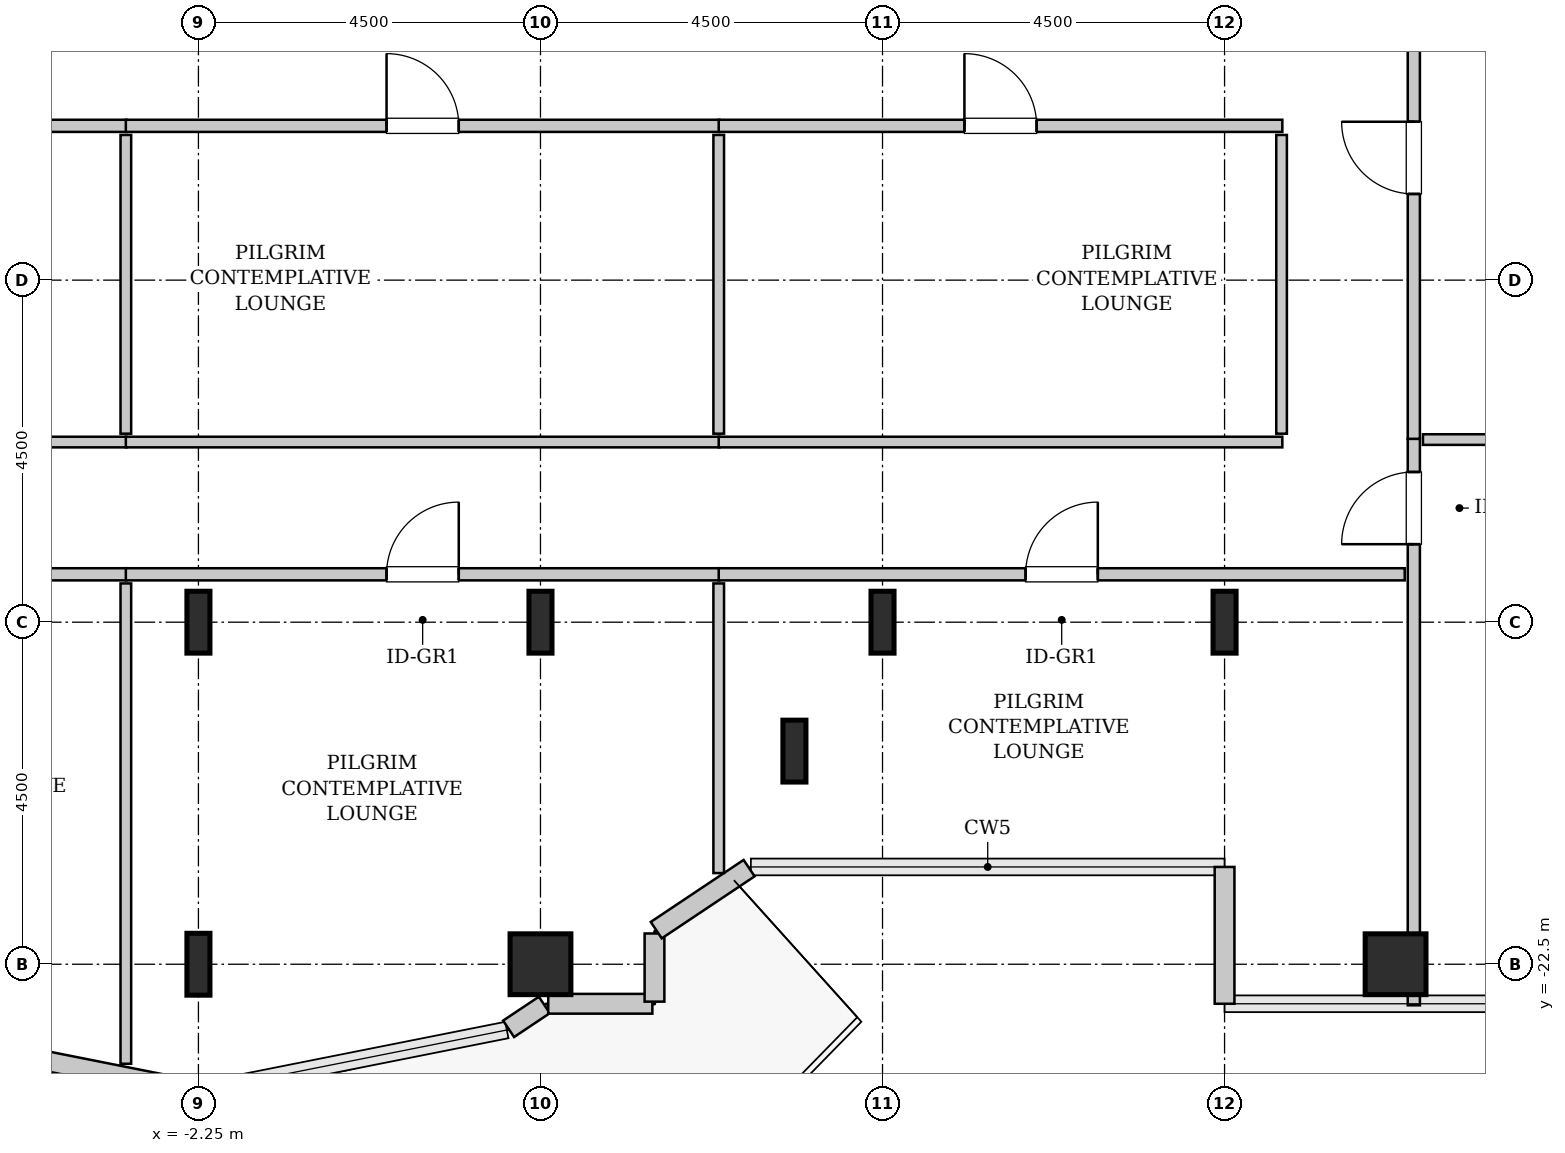
"""IFC4 building model, lengths in metres.
Left out: names, types, materials, properties, quantities, classifications, styles, units other than length and angle.
Written with IfcOpenShell. Run it as: python <this file> out.ifc"""

import sys

from ifc_helpers import new_model, si_unit, direction, frame, frame_2d, origin, origin_2d, place, context, subcontext, project, spatial, rectangle, hollow_rectangle, i_section, extrude, source, transform, mapped, element, fill, save


model = new_model("IFC4")
c1 = context("Model", 3, precision=1e-05, world=origin(), true_north=direction((0.0, 1.0)))
c2 = subcontext(c1, "Body", "Model", "MODEL_VIEW")
j1 = project(units=[si_unit("LENGTHUNIT", "METRE"), si_unit("PLANEANGLEUNIT", "RADIAN")], contexts=[c1])
p1 = place(None, origin())
s1 = spatial("IfcSite", under=j1, at=p1, CompositionType="ELEMENT")
p2 = place(p1, origin())
s2 = spatial("IfcBuilding", under=s1, at=p2, CompositionType="ELEMENT")
p3 = place(p2, frame((0.0, 0.0, 194.4)))
s3 = spatial("IfcBuildingStorey", under=s2, at=p3, CompositionType="ELEMENT", Elevation=194.4)
m1 = source(origin(), c2, "Body", "SweptSolid", [
    extrude(i_section(OverallWidth=0.303, OverallDepth=0.814, WebThickness=0.021, FlangeThickness=0.04, FilletRadius=0.03, at=origin_2d()), origin(), (0.0, 0.0, 1.0), 3.8),
])
for number, where, z_axis, x_axis in (
    (1, (-2.25, -22.5, 0.0), (0.0, 0.0, 1.0), (1.0, 0.0, 0.0)),
    (2, (-2.25, -18.0, 0.0), (0.0, 0.0, 1.0), (1.0, 0.0, 0.0)),
):
    element("IfcColumn", number, at=place(p3, frame(where, z_axis=z_axis, x_axis=x_axis)), inside=s3, PredefinedType="COLUMN", context=c2, shape_type="MappedRepresentation", body=[
        mapped(m1, transform((0.0, 0.0, 0.0), x_axis=(1.0, 0.0, 0.0), y_axis=(0.0, 1.0, 0.0), z_axis=(0.0, 0.0, 1.0), scale=1.0)),
    ])
m2 = source(origin(), c2, "Body", "SweptSolid", [
    extrude(hollow_rectangle(XDim=0.8, YDim=0.8, WallThickness=0.04, InnerFilletRadius=0.04, OuterFilletRadius=0.08, at=origin_2d()), origin(), (0.0, 0.0, 1.0), 3.8),
])
p4 = place(p3, frame((2.25, -22.5, 0.0), z_axis=(0.0, 0.0, 1.0), x_axis=(1.0, 0.0, 0.0)))
e3 = element("IfcColumn", 3, at=p4, inside=s3, PredefinedType="COLUMN", context=c2, shape_type="MappedRepresentation", body=[
    mapped(m2, transform((0.0, 0.0, 0.0), x_axis=(1.0, 0.0, 0.0), y_axis=(0.0, 1.0, 0.0), z_axis=(0.0, 0.0, 1.0), scale=1.0)),
])
for number, where, z_axis, x_axis in (
    (4, (2.25, -18.0, 0.0), (0.0, 0.0, 1.0), (1.0, 0.0, 0.0)),
    (5, (5.591, -19.696, 0.0), (0.0, 0.0, 1.0), (1.0, 0.0, 0.0)),
    (6, (6.75, -18.0, 0.0), (0.0, 0.0, 1.0), (1.0, 0.0, 0.0)),
    (7, (11.25, -18.0, 0.0), (0.0, 0.0, 1.0), (1.0, 0.0, 0.0)),
):
    element("IfcColumn", number, at=place(p3, frame(where, z_axis=z_axis, x_axis=x_axis)), inside=s3, PredefinedType="COLUMN", context=c2, shape_type="MappedRepresentation", body=[
        mapped(m1, transform((0.0, 0.0, 0.0), x_axis=(1.0, 0.0, 0.0), y_axis=(0.0, 1.0, 0.0), z_axis=(0.0, 0.0, 1.0), scale=1.0)),
    ])
p5 = place(p3, frame((13.5, -22.5, 0.0), z_axis=(0.0, 0.0, 1.0), x_axis=(1.0, 0.0, 0.0)))
e8 = element("IfcColumn", 8, at=p5, inside=s3, PredefinedType="COLUMN", context=c2, shape_type="MappedRepresentation", body=[
    mapped(m2, transform((0.0, 0.0, 0.0), x_axis=(1.0, 0.0, 0.0), y_axis=(0.0, 1.0, 0.0), z_axis=(0.0, 0.0, 1.0), scale=1.0)),
])
m3 = source(origin(), c2, "Body", "SweptSolid", [
    extrude(rectangle(XDim=1.8, YDim=0.26, at=frame_2d((0.9, 0.0))), origin(), (0.0, 0.0, 1.0), 3.55),
])
p6 = place(p3, frame((11.25, -21.22, 0.0), z_axis=(0.0, 0.0, 1.0), x_axis=(0.0, -1.0, 0.0)))
e9 = element("IfcWall", 9, at=p6, inside=s3, PredefinedType="SOLIDWALL", context=c2, shape_type="MappedRepresentation", body=[
    mapped(m3, transform((0.0, 0.0, 0.0), x_axis=(1.0, 0.0, 0.0), y_axis=(0.0, 1.0, 0.0), z_axis=(0.0, 0.0, 1.0), scale=1.0)),
])
m4 = source(origin(), c2, "Body", "SweptSolid", [
    extrude(rectangle(XDim=4.137, YDim=0.26, at=frame_2d((2.068, 0.0))), origin(), (0.0, 0.0, 1.0), 3.55),
])
p7 = place(p3, frame((-6.307, -23.365, 0.0), z_axis=(0.0, 0.0, 1.0), x_axis=(0.980782170794, -0.195105954428, 0.0)))
e10 = element("IfcWall", 10, at=p7, inside=s3, PredefinedType="SOLIDWALL", context=c2, shape_type="MappedRepresentation", body=[
    mapped(m4, transform((0.0, 0.0, 0.0), x_axis=(1.0, 0.0, 0.0), y_axis=(0.0, 1.0, 0.0), z_axis=(0.0, 0.0, 1.0), scale=1.0)),
])
p8 = place(p7, frame((0.488, 0.0, 0.0)))
e11 = element("IfcOpeningElement", 11, at=p8, cuts=e10, PredefinedType="OPENING", context=c2, shape_type="SweptSolid", body=[
    extrude(rectangle(XDim=1.1, YDim=2.2, at=frame_2d((0.55, 1.1))), frame((0.0, 0.14, 0.0), z_axis=(0.0, -1.0, 0.0), x_axis=(1.0, 0.0, 0.0)), (0.0, 0.0, 1.0), 0.28),
])
m5 = source(origin(), c2, "Body", "SweptSolid", [
    extrude(rectangle(XDim=0.565, YDim=0.26, at=frame_2d((0.283, 0.0))), origin(), (0.0, 0.0, 1.0), 3.55),
])
p9 = place(p3, frame((1.831, -23.35, 0.0), z_axis=(0.0, 0.0, 1.0), x_axis=(0.831651492666, 0.555297933317, 0.0)))
e12 = element("IfcWall", 12, at=p9, inside=s3, PredefinedType="SOLIDWALL", context=c2, shape_type="MappedRepresentation", body=[
    mapped(m5, transform((0.0, 0.0, 0.0), x_axis=(1.0, 0.0, 0.0), y_axis=(0.0, 1.0, 0.0), z_axis=(0.0, 0.0, 1.0), scale=1.0)),
])
m6 = source(origin(), c2, "Body", "SweptSolid", [
    extrude(rectangle(XDim=1.37, YDim=0.26, at=frame_2d((0.685, 0.0))), origin(), (0.0, 0.0, 1.0), 3.55),
])
p10 = place(p3, frame((2.352, -23.02, 0.0), z_axis=(0.0, 0.0, 1.0), x_axis=(1.0, 0.0, 0.0)))
e13 = element("IfcWall", 13, at=p10, inside=s3, PredefinedType="SOLIDWALL", context=c2, shape_type="MappedRepresentation", body=[
    mapped(m6, transform((0.0, 0.0, 0.0), x_axis=(1.0, 0.0, 0.0), y_axis=(0.0, 1.0, 0.0), z_axis=(0.0, 0.0, 1.0), scale=1.0)),
])
m7 = source(origin(), c2, "Body", "SweptSolid", [
    extrude(rectangle(XDim=0.897, YDim=0.26, at=frame_2d((0.448, 0.0))), origin(), (0.0, 0.0, 1.0), 3.55),
])
p11 = place(p3, frame((3.75, -22.992, 0.0), z_axis=(0.0, 0.0, 1.0), x_axis=(0.0, 1.0, 0.0)))
e14 = element("IfcWall", 14, at=p11, inside=s3, PredefinedType="SOLIDWALL", context=c2, shape_type="MappedRepresentation", body=[
    mapped(m7, transform((0.0, 0.0, 0.0), x_axis=(1.0, 0.0, 0.0), y_axis=(0.0, 1.0, 0.0), z_axis=(0.0, 0.0, 1.0), scale=1.0)),
])
m8 = source(origin(), c2, "Body", "SweptSolid", [
    extrude(rectangle(XDim=1.469, YDim=0.26, at=frame_2d((0.734, 0.0))), origin(), (0.0, 0.0, 1.0), 3.55),
])
p12 = place(p3, frame((3.773, -22.052, 0.0), z_axis=(0.0, 0.0, 1.0), x_axis=(0.831461760506, 0.555581983884, 0.0)))
e15 = element("IfcWall", 15, at=p12, inside=s3, PredefinedType="SOLIDWALL", context=c2, shape_type="MappedRepresentation", body=[
    mapped(m8, transform((0.0, 0.0, 0.0), x_axis=(1.0, 0.0, 0.0), y_axis=(0.0, 1.0, 0.0), z_axis=(0.0, 0.0, 1.0), scale=1.0)),
])
m9 = source(origin(), c2, "Body", "SweptSolid", [
    extrude(rectangle(XDim=7.453, YDim=0.16, at=frame_2d((3.726, 0.0))), origin(), (0.0, 0.0, 1.0), 3.535),
])
p13 = place(p3, frame((13.74, -23.04, 0.0), z_axis=(0.0, 0.0, 1.0), x_axis=(0.0, 1.0, 0.0)))
e16 = element("IfcWall", 16, at=p13, inside=s3, PredefinedType="PARTITIONING", context=c2, shape_type="MappedRepresentation", body=[
    mapped(m9, transform((0.0, 0.0, 0.0), x_axis=(1.0, 0.0, 0.0), y_axis=(0.0, 1.0, 0.0), z_axis=(0.0, 0.0, 1.0), scale=1.0)),
])
p14 = place(p13, frame((6.066, 0.0, 0.0)))
e17 = element("IfcOpeningElement", 17, at=p14, cuts=e16, PredefinedType="OPENING", context=c2, shape_type="SweptSolid", body=[
    extrude(rectangle(XDim=0.95, YDim=2.1, at=frame_2d((0.475, 1.05))), frame((0.0, 0.09, 0.0), z_axis=(0.0, -1.0, 0.0), x_axis=(1.0, 0.0, 0.0)), (0.0, 0.0, 1.0), 0.18),
])
m10 = source(origin(), c2, "Body", "SweptSolid", [
    extrude(rectangle(XDim=11.43, YDim=0.14, at=frame_2d((5.715, 0.0))), origin(), (0.0, 0.0, 1.0), 3.535),
])
p15 = place(p3, frame((13.86, -15.597, 0.0), z_axis=(0.0, 0.0, 1.0), x_axis=(1.0, 0.0, 0.0)))
e18 = element("IfcWall", 18, at=p15, inside=s3, PredefinedType="PARTITIONING", context=c2, shape_type="MappedRepresentation", body=[
    mapped(m10, transform((0.0, 0.0, 0.0), x_axis=(1.0, 0.0, 0.0), y_axis=(0.0, 1.0, 0.0), z_axis=(0.0, 0.0, 1.0), scale=1.0)),
])
m11 = source(origin(), c2, "Body", "SweptSolid", [
    extrude(rectangle(XDim=7.392, YDim=0.16, at=frame_2d((3.696, 0.0))), origin(), (0.0, 0.0, 1.0), 3.535),
])
p16 = place(p3, frame((13.74, -15.587, 0.0), z_axis=(0.0, 0.0, 1.0), x_axis=(0.0, 1.0, 0.0)))
e19 = element("IfcWall", 19, at=p16, inside=s3, PredefinedType="PARTITIONING", context=c2, shape_type="MappedRepresentation", body=[
    mapped(m11, transform((0.0, 0.0, 0.0), x_axis=(1.0, 0.0, 0.0), y_axis=(0.0, 1.0, 0.0), z_axis=(0.0, 0.0, 1.0), scale=1.0)),
])
p17 = place(p16, frame((3.221, 0.0, 0.0)))
e20 = element("IfcOpeningElement", 20, at=p17, cuts=e19, PredefinedType="OPENING", context=c2, shape_type="SweptSolid", body=[
    extrude(rectangle(XDim=0.95, YDim=2.1, at=frame_2d((0.475, 1.05))), frame((0.0, 0.09, 0.0), z_axis=(0.0, -1.0, 0.0), x_axis=(1.0, 0.0, 0.0)), (0.0, 0.0, 1.0), 0.18),
])
m12 = source(origin(), c2, "Body", "SweptSolid", [
    extrude(rectangle(XDim=6.81, YDim=0.16, at=frame_2d((3.405, 0.0))), origin(), (0.0, 0.0, 1.0), 3.535),
])
p18 = place(p3, frame((-10.005, -17.37, 0.0), z_axis=(0.0, 0.0, 1.0), x_axis=(1.0, 0.0, 0.0)))
e21 = element("IfcWall", 21, at=p18, inside=s3, PredefinedType="PARTITIONING", context=c2, shape_type="MappedRepresentation", body=[
    mapped(m12, transform((0.0, 0.0, 0.0), x_axis=(1.0, 0.0, 0.0), y_axis=(0.0, 1.0, 0.0), z_axis=(0.0, 0.0, 1.0), scale=1.0)),
])
p19 = place(p18, frame((3.778, 0.0, 0.0)))
e22 = element("IfcOpeningElement", 22, at=p19, cuts=e21, PredefinedType="OPENING", context=c2, shape_type="SweptSolid", body=[
    extrude(rectangle(XDim=0.95, YDim=2.1, at=frame_2d((0.475, 1.05))), frame((0.0, 0.09, 0.0), z_axis=(0.0, -1.0, 0.0), x_axis=(1.0, 0.0, 0.0)), (0.0, 0.0, 1.0), 0.18),
])
m13 = source(origin(), c2, "Body", "SweptSolid", [
    extrude(rectangle(XDim=6.319, YDim=0.14, at=frame_2d((3.16, 0.0))), origin(), (0.0, 0.0, 1.0), 3.535),
])
p20 = place(p3, frame((-3.205, -23.809, 0.0), z_axis=(0.0, 0.0, 1.0), x_axis=(0.0, 1.0, 0.0)))
e23 = element("IfcWall", 23, at=p20, inside=s3, PredefinedType="PARTITIONING", context=c2, shape_type="MappedRepresentation", body=[
    mapped(m13, transform((0.0, 0.0, 0.0), x_axis=(1.0, 0.0, 0.0), y_axis=(0.0, 1.0, 0.0), z_axis=(0.0, 0.0, 1.0), scale=1.0)),
])
m14 = source(origin(), c2, "Body", "SweptSolid", [
    extrude(rectangle(XDim=6.7, YDim=0.16, at=frame_2d((3.35, 0.0))), origin(), (0.0, 0.0, 1.0), 3.535),
])
p21 = place(p3, frame((-9.895, -11.47, 0.0), z_axis=(0.0, 0.0, 1.0), x_axis=(1.0, 0.0, 0.0)))
e24 = element("IfcWall", 24, at=p21, inside=s3, PredefinedType="PARTITIONING", context=c2, shape_type="MappedRepresentation", body=[
    mapped(m14, transform((0.0, 0.0, 0.0), x_axis=(1.0, 0.0, 0.0), y_axis=(0.0, 1.0, 0.0), z_axis=(0.0, 0.0, 1.0), scale=1.0)),
])
p22 = place(p21, frame((2.875, 0.0, 0.0)))
e25 = element("IfcOpeningElement", 25, at=p22, cuts=e24, PredefinedType="OPENING", context=c2, shape_type="SweptSolid", body=[
    extrude(rectangle(XDim=0.95, YDim=2.1, at=frame_2d((0.475, 1.05))), frame((0.0, 0.09, 0.0), z_axis=(0.0, -1.0, 0.0), x_axis=(1.0, 0.0, 0.0)), (0.0, 0.0, 1.0), 0.18),
])
m15 = source(origin(), c2, "Body", "SweptSolid", [
    extrude(rectangle(XDim=6.7, YDim=0.14, at=frame_2d((3.35, 0.0))), origin(), (0.0, 0.0, 1.0), 3.535),
])
p23 = place(p3, frame((-9.895, -15.63, 0.0), z_axis=(0.0, 0.0, 1.0), x_axis=(1.0, 0.0, 0.0)))
e26 = element("IfcWall", 26, at=p23, inside=s3, PredefinedType="PARTITIONING", context=c2, shape_type="MappedRepresentation", body=[
    mapped(m15, transform((0.0, 0.0, 0.0), x_axis=(1.0, 0.0, 0.0), y_axis=(0.0, 1.0, 0.0), z_axis=(0.0, 0.0, 1.0), scale=1.0)),
])
m16 = source(origin(), c2, "Body", "SweptSolid", [
    extrude(rectangle(XDim=3.93, YDim=0.14, at=frame_2d((1.965, 0.0))), origin(), (0.0, 0.0, 1.0), 3.535),
])
p24 = place(p3, frame((-3.205, -15.52, 0.0), z_axis=(0.0, 0.0, 1.0), x_axis=(0.0, 1.0, 0.0)))
e27 = element("IfcWall", 27, at=p24, inside=s3, PredefinedType="PARTITIONING", context=c2, shape_type="MappedRepresentation", body=[
    mapped(m16, transform((0.0, 0.0, 0.0), x_axis=(1.0, 0.0, 0.0), y_axis=(0.0, 1.0, 0.0), z_axis=(0.0, 0.0, 1.0), scale=1.0)),
])
m17 = source(origin(), c2, "Body", "SweptSolid", [
    extrude(rectangle(XDim=7.81, YDim=0.16, at=frame_2d((3.905, 0.0))), origin(), (0.0, 0.0, 1.0), 3.535),
])
p25 = place(p3, frame((-3.205, -17.37, 0.0), z_axis=(0.0, 0.0, 1.0), x_axis=(1.0, 0.0, 0.0)))
e28 = element("IfcWall", 28, at=p25, inside=s3, PredefinedType="PARTITIONING", context=c2, shape_type="MappedRepresentation", body=[
    mapped(m17, transform((0.0, 0.0, 0.0), x_axis=(1.0, 0.0, 0.0), y_axis=(0.0, 1.0, 0.0), z_axis=(0.0, 0.0, 1.0), scale=1.0)),
])
p26 = place(p25, frame((3.43, 0.0, 0.0)))
e29 = element("IfcOpeningElement", 29, at=p26, cuts=e28, PredefinedType="OPENING", context=c2, shape_type="SweptSolid", body=[
    extrude(rectangle(XDim=0.95, YDim=2.1, at=frame_2d((0.475, 1.05))), frame((0.0, 0.09, 0.0), z_axis=(0.0, -1.0, 0.0), x_axis=(1.0, 0.0, 0.0)), (0.0, 0.0, 1.0), 0.18),
])
m18 = source(origin(), c2, "Body", "SweptSolid", [
    extrude(rectangle(XDim=3.811, YDim=0.14, at=frame_2d((1.905, 0.0))), origin(), (0.0, 0.0, 1.0), 3.535),
])
p27 = place(p3, frame((4.595, -21.301, 0.0), z_axis=(0.0, 0.0, 1.0), x_axis=(0.0, 1.0, 0.0)))
e30 = element("IfcWall", 30, at=p27, inside=s3, PredefinedType="PARTITIONING", context=c2, shape_type="MappedRepresentation", body=[
    mapped(m18, transform((0.0, 0.0, 0.0), x_axis=(1.0, 0.0, 0.0), y_axis=(0.0, 1.0, 0.0), z_axis=(0.0, 0.0, 1.0), scale=1.0)),
])
p28 = place(p3, frame((-3.205, -11.47, 0.0), z_axis=(0.0, 0.0, 1.0), x_axis=(1.0, 0.0, 0.0)))
e31 = element("IfcWall", 31, at=p28, inside=s3, PredefinedType="PARTITIONING", context=c2, shape_type="MappedRepresentation", body=[
    mapped(m17, transform((0.0, 0.0, 0.0), x_axis=(1.0, 0.0, 0.0), y_axis=(0.0, 1.0, 0.0), z_axis=(0.0, 0.0, 1.0), scale=1.0)),
])
p29 = place(p28, frame((3.43, 0.0, 0.0)))
e32 = element("IfcOpeningElement", 32, at=p29, cuts=e31, PredefinedType="OPENING", context=c2, shape_type="SweptSolid", body=[
    extrude(rectangle(XDim=0.95, YDim=2.1, at=frame_2d((0.475, 1.05))), frame((0.0, 0.09, 0.0), z_axis=(0.0, -1.0, 0.0), x_axis=(1.0, 0.0, 0.0)), (0.0, 0.0, 1.0), 0.18),
])
m19 = source(origin(), c2, "Body", "SweptSolid", [
    extrude(rectangle(XDim=7.81, YDim=0.14, at=frame_2d((3.905, 0.0))), origin(), (0.0, 0.0, 1.0), 3.535),
])
p30 = place(p3, frame((-3.205, -15.63, 0.0), z_axis=(0.0, 0.0, 1.0), x_axis=(1.0, 0.0, 0.0)))
e33 = element("IfcWall", 33, at=p30, inside=s3, PredefinedType="PARTITIONING", context=c2, shape_type="MappedRepresentation", body=[
    mapped(m19, transform((0.0, 0.0, 0.0), x_axis=(1.0, 0.0, 0.0), y_axis=(0.0, 1.0, 0.0), z_axis=(0.0, 0.0, 1.0), scale=1.0)),
])
p31 = place(p3, frame((4.595, -15.52, 0.0), z_axis=(0.0, 0.0, 1.0), x_axis=(0.0, 1.0, 0.0)))
e34 = element("IfcWall", 34, at=p31, inside=s3, PredefinedType="PARTITIONING", context=c2, shape_type="MappedRepresentation", body=[
    mapped(m16, transform((0.0, 0.0, 0.0), x_axis=(1.0, 0.0, 0.0), y_axis=(0.0, 1.0, 0.0), z_axis=(0.0, 0.0, 1.0), scale=1.0)),
])
m20 = source(origin(), c2, "Body", "SweptSolid", [
    extrude(rectangle(XDim=9.025, YDim=0.16, at=frame_2d((4.513, 0.0))), origin(), (0.0, 0.0, 1.0), 3.535),
])
p32 = place(p3, frame((4.595, -17.37, 0.0), z_axis=(0.0, 0.0, 1.0), x_axis=(1.0, 0.0, 0.0)))
e35 = element("IfcWall", 35, at=p32, inside=s3, PredefinedType="PARTITIONING", context=c2, shape_type="MappedRepresentation", body=[
    mapped(m20, transform((0.0, 0.0, 0.0), x_axis=(1.0, 0.0, 0.0), y_axis=(0.0, 1.0, 0.0), z_axis=(0.0, 0.0, 1.0), scale=1.0)),
])
p33 = place(p32, frame((4.038, 0.0, 0.0)))
e36 = element("IfcOpeningElement", 36, at=p33, cuts=e35, PredefinedType="OPENING", context=c2, shape_type="SweptSolid", body=[
    extrude(rectangle(XDim=0.95, YDim=2.1, at=frame_2d((0.475, 1.05))), frame((0.0, 0.09, 0.0), z_axis=(0.0, -1.0, 0.0), x_axis=(1.0, 0.0, 0.0)), (0.0, 0.0, 1.0), 0.18),
])
m21 = source(origin(), c2, "Body", "SweptSolid", [
    extrude(rectangle(XDim=7.415, YDim=0.16, at=frame_2d((3.708, 0.0))), origin(), (0.0, 0.0, 1.0), 3.535),
])
p34 = place(p3, frame((4.595, -11.47, 0.0), z_axis=(0.0, 0.0, 1.0), x_axis=(1.0, 0.0, 0.0)))
e37 = element("IfcWall", 37, at=p34, inside=s3, PredefinedType="PARTITIONING", context=c2, shape_type="MappedRepresentation", body=[
    mapped(m21, transform((0.0, 0.0, 0.0), x_axis=(1.0, 0.0, 0.0), y_axis=(0.0, 1.0, 0.0), z_axis=(0.0, 0.0, 1.0), scale=1.0)),
])
p35 = place(p34, frame((3.232, 0.0, 0.0)))
e38 = element("IfcOpeningElement", 38, at=p35, cuts=e37, PredefinedType="OPENING", context=c2, shape_type="SweptSolid", body=[
    extrude(rectangle(XDim=0.95, YDim=2.1, at=frame_2d((0.475, 1.05))), frame((0.0, 0.09, 0.0), z_axis=(0.0, -1.0, 0.0), x_axis=(1.0, 0.0, 0.0)), (0.0, 0.0, 1.0), 0.18),
])
m22 = source(origin(), c2, "Body", "SweptSolid", [
    extrude(rectangle(XDim=7.415, YDim=0.14, at=frame_2d((3.708, 0.0))), origin(), (0.0, 0.0, 1.0), 3.535),
])
p36 = place(p3, frame((4.595, -15.63, 0.0), z_axis=(0.0, 0.0, 1.0), x_axis=(1.0, 0.0, 0.0)))
e39 = element("IfcWall", 39, at=p36, inside=s3, PredefinedType="PARTITIONING", context=c2, shape_type="MappedRepresentation", body=[
    mapped(m22, transform((0.0, 0.0, 0.0), x_axis=(1.0, 0.0, 0.0), y_axis=(0.0, 1.0, 0.0), z_axis=(0.0, 0.0, 1.0), scale=1.0)),
])
p37 = place(p3, frame((12.0, -15.52, 0.0), z_axis=(0.0, 0.0, 1.0), x_axis=(0.0, 1.0, 0.0)))
e40 = element("IfcWall", 40, at=p37, inside=s3, PredefinedType="PARTITIONING", context=c2, shape_type="MappedRepresentation", body=[
    mapped(m16, transform((0.0, 0.0, 0.0), x_axis=(1.0, 0.0, 0.0), y_axis=(0.0, 1.0, 0.0), z_axis=(0.0, 0.0, 1.0), scale=1.0)),
])
m23 = source(origin(), c2, "Body", "SweptSolid", [
    extrude(rectangle(XDim=0.95, YDim=2.1, at=frame_2d((0.475, 1.05))), frame((0.0, 0.025, 0.0), z_axis=(0.0, -1.0, 0.0), x_axis=(1.0, 0.0, 0.0)), (0.0, 0.0, 1.0), 0.05),
])
p38 = place(p14, origin())
e41 = element("IfcDoor", 41, at=p38, inside=s3, OperationType="SINGLE_SWING_LEFT", PredefinedType="DOOR", context=c2, shape_type="MappedRepresentation", body=[
    mapped(m23, transform((0.0, 0.0, 0.0), x_axis=(1.0, 0.0, 0.0), y_axis=(0.0, 1.0, 0.0), z_axis=(0.0, 0.0, 1.0), scale=1.0)),
])
fill(e17, e41)
p39 = place(p17, origin())
e42 = element("IfcDoor", 42, at=p39, inside=s3, OperationType="SINGLE_SWING_RIGHT", PredefinedType="DOOR", context=c2, shape_type="MappedRepresentation", body=[
    mapped(m23, transform((0.0, 0.0, 0.0), x_axis=(1.0, 0.0, 0.0), y_axis=(0.0, 1.0, 0.0), z_axis=(0.0, 0.0, 1.0), scale=1.0)),
])
fill(e20, e42)
p40 = place(p26, origin())
e43 = element("IfcDoor", 43, at=p40, inside=s3, OperationType="SINGLE_SWING_RIGHT", PredefinedType="DOOR", context=c2, shape_type="MappedRepresentation", body=[
    mapped(m23, transform((0.0, 0.0, 0.0), x_axis=(1.0, 0.0, 0.0), y_axis=(0.0, 1.0, 0.0), z_axis=(0.0, 0.0, 1.0), scale=1.0)),
])
fill(e29, e43)
p41 = place(p29, origin())
e44 = element("IfcDoor", 44, at=p41, inside=s3, OperationType="SINGLE_SWING_LEFT", PredefinedType="DOOR", context=c2, shape_type="MappedRepresentation", body=[
    mapped(m23, transform((0.0, 0.0, 0.0), x_axis=(1.0, 0.0, 0.0), y_axis=(0.0, 1.0, 0.0), z_axis=(0.0, 0.0, 1.0), scale=1.0)),
])
fill(e32, e44)
p42 = place(p33, origin())
e45 = element("IfcDoor", 45, at=p42, inside=s3, OperationType="SINGLE_SWING_RIGHT", PredefinedType="DOOR", context=c2, shape_type="MappedRepresentation", body=[
    mapped(m23, transform((0.0, 0.0, 0.0), x_axis=(1.0, 0.0, 0.0), y_axis=(0.0, 1.0, 0.0), z_axis=(0.0, 0.0, 1.0), scale=1.0)),
])
fill(e36, e45)
p43 = place(p35, origin())
e46 = element("IfcDoor", 46, at=p43, inside=s3, OperationType="SINGLE_SWING_LEFT", PredefinedType="DOOR", context=c2, shape_type="MappedRepresentation", body=[
    mapped(m23, transform((0.0, 0.0, 0.0), x_axis=(1.0, 0.0, 0.0), y_axis=(0.0, 1.0, 0.0), z_axis=(0.0, 0.0, 1.0), scale=1.0)),
])
fill(e38, e46)
save(model, sys.argv[1])
